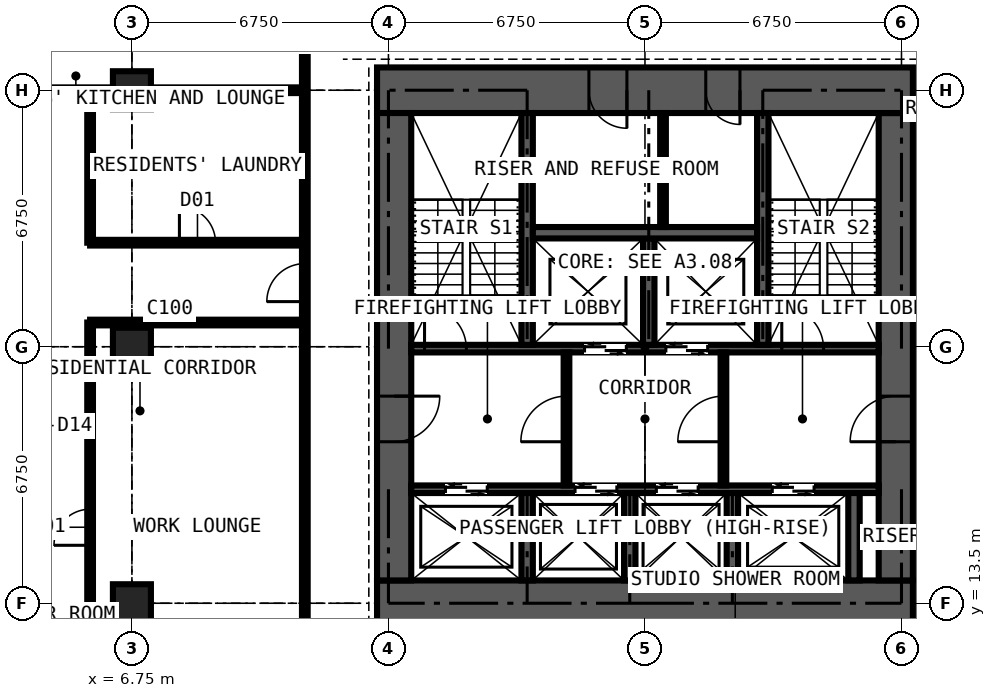
"""IFC4 building model, lengths in metres.
Left out: names, types, materials, properties, quantities, classifications, styles, units other than length and angle.
Written with IfcOpenShell. Run it as: python <this file> out.ifc"""

import sys

from ifc_helpers import new_model, si_unit, direction, frame, frame_2d, origin, origin_2d, place, context, subcontext, project, spatial, rectangle, extrude, element, fill, save


model = new_model("IFC4")
c1 = context("Model", 3, precision=1e-05, world=origin(), true_north=direction((0.0, 1.0)))
c2 = subcontext(c1, "Body", "Model", "MODEL_VIEW")
j1 = project(units=[si_unit("LENGTHUNIT", "METRE"), si_unit("PLANEANGLEUNIT", "RADIAN")], contexts=[c1])
p1 = place(None, origin())
s1 = spatial("IfcSite", under=j1, at=p1, CompositionType="ELEMENT")
p2 = place(p1, origin())
s2 = spatial("IfcBuilding", under=s1, at=p2, CompositionType="ELEMENT")
p3 = place(p2, frame((0.0, 0.0, 233.1)))
s3 = spatial("IfcBuildingStorey", under=s2, at=p3, CompositionType="ELEMENT", Elevation=233.1)
for number, where, z_axis, x_axis in (
    (1, (6.75, 13.5, 0.0), (0.0, 0.0, 1.0), (1.0, 0.0, 0.0)),
    (2, (6.75, 20.25, 0.0), (0.0, 0.0, 1.0), (1.0, 0.0, 0.0)),
    (3, (6.75, 27.0, 0.0), (0.0, 0.0, 1.0), (1.0, 0.0, 0.0)),
):
    element("IfcColumn", number, at=place(p3, frame(where, z_axis=z_axis, x_axis=x_axis)), inside=s3, PredefinedType="COLUMN", context=c2, shape_type="SweptSolid", body=[
        extrude(rectangle(XDim=1.0, YDim=1.0, at=origin_2d()), origin(), (0.0, 0.0, 1.0), 3.6),
    ])
p4 = place(p3, frame((13.2, 13.5, 0.0), z_axis=(0.0, 0.0, 1.0), x_axis=(1.0, 0.0, 0.0)))
e4 = element("IfcWall", 4, at=p4, inside=s3, PredefinedType="SHEAR", context=c2, shape_type="SweptSolid", body=[
    extrude(rectangle(XDim=14.1, YDim=1.2, at=frame_2d((7.05, 0.0))), origin(), (0.0, 0.0, 1.0), 3.6),
])
p5 = place(p3, frame((26.85, 14.1, 0.0), z_axis=(0.0, 0.0, 1.0), x_axis=(0.0, 1.0, 0.0)))
e5 = element("IfcWall", 5, at=p5, inside=s3, PredefinedType="SHEAR", context=c2, shape_type="SweptSolid", body=[
    extrude(rectangle(XDim=12.3, YDim=0.9, at=frame_2d((6.15, 0.0))), origin(), (0.0, 0.0, 1.0), 3.6),
])
p6 = place(p5, frame((3.65, 0.0, 0.0)))
e6 = element("IfcOpeningElement", 6, at=p6, cuts=e5, PredefinedType="OPENING", context=c2, shape_type="SweptSolid", body=[
    extrude(rectangle(XDim=1.2, YDim=2.2, at=frame_2d((0.6, 1.1))), frame((0.0, 0.46, 0.0), z_axis=(0.0, -1.0, 0.0), x_axis=(1.0, 0.0, 0.0)), (0.0, 0.0, 1.0), 0.92),
])
p7 = place(p3, frame((27.3, 27.0, 0.0), z_axis=(0.0, 0.0, 1.0), x_axis=(-1.0, 0.0, 0.0)))
e7 = element("IfcWall", 7, at=p7, inside=s3, PredefinedType="SHEAR", context=c2, shape_type="SweptSolid", body=[
    extrude(rectangle(XDim=14.1, YDim=1.2, at=frame_2d((7.05, 0.0))), origin(), (0.0, 0.0, 1.0), 3.6),
])
p8 = place(p7, frame((4.55, 0.0, 0.0)))
e8 = element("IfcOpeningElement", 8, at=p8, cuts=e7, PredefinedType="OPENING", context=c2, shape_type="SweptSolid", body=[
    extrude(rectangle(XDim=0.9, YDim=2.2, at=frame_2d((0.45, 1.1))), frame((0.0, 0.61, 0.0), z_axis=(0.0, -1.0, 0.0), x_axis=(1.0, 0.0, 0.0)), (0.0, 0.0, 1.0), 1.22),
])
p9 = place(p7, frame((7.525, 0.0, 0.0)))
e9 = element("IfcOpeningElement", 9, at=p9, cuts=e7, PredefinedType="OPENING", context=c2, shape_type="SweptSolid", body=[
    extrude(rectangle(XDim=1.0, YDim=2.2, at=frame_2d((0.5, 1.1))), frame((0.0, 0.61, 0.0), z_axis=(0.0, -1.0, 0.0), x_axis=(1.0, 0.0, 0.0)), (0.0, 0.0, 1.0), 1.22),
])
p10 = place(p3, frame((13.65, 26.4, 0.0), z_axis=(0.0, 0.0, 1.0), x_axis=(0.0, -1.0, 0.0)))
e10 = element("IfcWall", 10, at=p10, inside=s3, PredefinedType="SHEAR", context=c2, shape_type="SweptSolid", body=[
    extrude(rectangle(XDim=12.3, YDim=0.9, at=frame_2d((6.15, 0.0))), origin(), (0.0, 0.0, 1.0), 3.6),
])
p11 = place(p10, frame((7.45, 0.0, 0.0)))
e11 = element("IfcOpeningElement", 11, at=p11, cuts=e10, PredefinedType="OPENING", context=c2, shape_type="SweptSolid", body=[
    extrude(rectangle(XDim=1.2, YDim=2.2, at=frame_2d((0.6, 1.1))), frame((0.0, 0.46, 0.0), z_axis=(0.0, -1.0, 0.0), x_axis=(1.0, 0.0, 0.0)), (0.0, 0.0, 1.0), 0.92),
])
p12 = place(p3, frame((14.1, 16.5, 0.0), z_axis=(0.0, 0.0, 1.0), x_axis=(1.0, 0.0, 0.0)))
e12 = element("IfcWall", 12, at=p12, inside=s3, PredefinedType="SHEAR", context=c2, shape_type="SweptSolid", body=[
    extrude(rectangle(XDim=12.3, YDim=0.2, at=frame_2d((6.15, 0.0))), origin(), (0.0, 0.0, 1.0), 3.6),
])
p13 = place(p12, frame((0.9, 0.0, 0.0)))
e13 = element("IfcOpeningElement", 13, at=p13, cuts=e12, PredefinedType="OPENING", context=c2, shape_type="SweptSolid", body=[
    extrude(rectangle(XDim=1.1, YDim=2.2, at=frame_2d((0.55, 1.1))), frame((0.0, 0.11, 0.0), z_axis=(0.0, -1.0, 0.0), x_axis=(1.0, 0.0, 0.0)), (0.0, 0.0, 1.0), 0.22),
])
p14 = place(p12, frame((4.31, 0.0, 0.0)))
e14 = element("IfcOpeningElement", 14, at=p14, cuts=e12, PredefinedType="OPENING", context=c2, shape_type="SweptSolid", body=[
    extrude(rectangle(XDim=1.1, YDim=2.2, at=frame_2d((0.55, 1.1))), frame((0.0, 0.11, 0.0), z_axis=(0.0, -1.0, 0.0), x_axis=(1.0, 0.0, 0.0)), (0.0, 0.0, 1.0), 0.22),
])
p15 = place(p12, frame((6.45, 0.0, 0.0)))
e15 = element("IfcOpeningElement", 15, at=p15, cuts=e12, PredefinedType="OPENING", context=c2, shape_type="SweptSolid", body=[
    extrude(rectangle(XDim=1.1, YDim=2.2, at=frame_2d((0.55, 1.1))), frame((0.0, 0.11, 0.0), z_axis=(0.0, -1.0, 0.0), x_axis=(1.0, 0.0, 0.0)), (0.0, 0.0, 1.0), 0.22),
])
p16 = place(p12, frame((9.5, 0.0, 0.0)))
e16 = element("IfcOpeningElement", 16, at=p16, cuts=e12, PredefinedType="OPENING", context=c2, shape_type="SweptSolid", body=[
    extrude(rectangle(XDim=1.1, YDim=2.2, at=frame_2d((0.55, 1.1))), frame((0.0, 0.11, 0.0), z_axis=(0.0, -1.0, 0.0), x_axis=(1.0, 0.0, 0.0)), (0.0, 0.0, 1.0), 0.22),
])
p17 = place(p3, frame((14.1, 20.2, 0.0), z_axis=(0.0, 0.0, 1.0), x_axis=(1.0, 0.0, 0.0)))
e17 = element("IfcWall", 17, at=p17, inside=s3, PredefinedType="SHEAR", context=c2, shape_type="SweptSolid", body=[
    extrude(rectangle(XDim=12.3, YDim=0.2, at=frame_2d((6.15, 0.0))), origin(), (0.0, 0.0, 1.0), 3.6),
])
p18 = place(p17, frame((4.56, 0.0, 0.0)))
e18 = element("IfcOpeningElement", 18, at=p18, cuts=e17, PredefinedType="OPENING", context=c2, shape_type="SweptSolid", body=[
    extrude(rectangle(XDim=1.1, YDim=2.2, at=frame_2d((0.55, 1.1))), frame((0.0, 0.11, 0.0), z_axis=(0.0, -1.0, 0.0), x_axis=(1.0, 0.0, 0.0)), (0.0, 0.0, 1.0), 0.22),
])
p19 = place(p17, frame((6.7, 0.0, 0.0)))
e19 = element("IfcOpeningElement", 19, at=p19, cuts=e17, PredefinedType="OPENING", context=c2, shape_type="SweptSolid", body=[
    extrude(rectangle(XDim=1.1, YDim=2.2, at=frame_2d((0.55, 1.1))), frame((0.0, 0.11, 0.0), z_axis=(0.0, -1.0, 0.0), x_axis=(1.0, 0.0, 0.0)), (0.0, 0.0, 1.0), 0.22),
])
p20 = place(p17, frame((0.35, 0.0, 0.0)))
e20 = element("IfcOpeningElement", 20, at=p20, cuts=e17, PredefinedType="OPENING", context=c2, shape_type="SweptSolid", body=[
    extrude(rectangle(XDim=1.1, YDim=2.2, at=frame_2d((0.55, 1.1))), frame((0.0, 0.11, 0.0), z_axis=(0.0, -1.0, 0.0), x_axis=(1.0, 0.0, 0.0)), (0.0, 0.0, 1.0), 0.22),
])
p21 = place(p17, frame((9.75, 0.0, 0.0)))
e21 = element("IfcOpeningElement", 21, at=p21, cuts=e17, PredefinedType="OPENING", context=c2, shape_type="SweptSolid", body=[
    extrude(rectangle(XDim=1.1, YDim=2.2, at=frame_2d((0.55, 1.1))), frame((0.0, 0.11, 0.0), z_axis=(0.0, -1.0, 0.0), x_axis=(1.0, 0.0, 0.0)), (0.0, 0.0, 1.0), 0.22),
])
for number, where, z_axis, x_axis in (
    (22, (17.15, 20.3, 0.0), (0.0, 0.0, 1.0), (0.0, 1.0, 0.0)),
    (23, (23.35, 20.3, 0.0), (0.0, 0.0, 1.0), (0.0, 1.0, 0.0)),
):
    element("IfcWall", number, at=place(p3, frame(where, z_axis=z_axis, x_axis=x_axis)), inside=s3, PredefinedType="SHEAR", context=c2, shape_type="SweptSolid", body=[
        extrude(rectangle(XDim=6.1, YDim=0.3, at=frame_2d((3.05, 0.0))), origin(), (0.0, 0.0, 1.0), 3.6),
    ])
p22 = place(p3, frame((20.35, 20.3, 0.0), z_axis=(0.0, 0.0, 1.0), x_axis=(0.0, 1.0, 0.0)))
e24 = element("IfcWall", 24, at=p22, inside=s3, PredefinedType="SHEAR", context=c2, shape_type="SweptSolid", body=[
    extrude(rectangle(XDim=2.8, YDim=0.3, at=frame_2d((1.4, 0.0))), origin(), (0.0, 0.0, 1.0), 3.6),
])
p23 = place(p3, frame((17.3, 23.25, 0.0), z_axis=(0.0, 0.0, 1.0), x_axis=(1.0, 0.0, 0.0)))
e25 = element("IfcWall", 25, at=p23, inside=s3, PredefinedType="SHEAR", context=c2, shape_type="SweptSolid", body=[
    extrude(rectangle(XDim=5.9, YDim=0.3, at=frame_2d((2.95, 0.0))), origin(), (0.0, 0.0, 1.0), 3.6),
])
for number, where, z_axis, x_axis in (
    (26, (17.15, 14.1, 0.0), (0.0, 0.0, 1.0), (0.0, 1.0, 0.0)),
    (27, (19.85, 14.1, 0.0), (0.0, 0.0, 1.0), (0.0, 1.0, 0.0)),
    (28, (22.55, 14.1, 0.0), (0.0, 0.0, 1.0), (0.0, 1.0, 0.0)),
    (29, (25.75, 14.1, 0.0), (0.0, 0.0, 1.0), (0.0, 1.0, 0.0)),
):
    element("IfcWall", number, at=place(p3, frame(where, z_axis=z_axis, x_axis=x_axis)), inside=s3, PredefinedType="SHEAR", context=c2, shape_type="SweptSolid", body=[
        extrude(rectangle(XDim=2.3, YDim=0.3, at=frame_2d((1.15, 0.0))), origin(), (0.0, 0.0, 1.0), 3.6),
    ])
p24 = place(p3, frame((18.185, 16.6, 0.0), z_axis=(0.0, 0.0, 1.0), x_axis=(0.0, 1.0, 0.0)))
e30 = element("IfcWall", 30, at=p24, inside=s3, PredefinedType="PARTITIONING", context=c2, shape_type="SweptSolid", body=[
    extrude(rectangle(XDim=3.5, YDim=0.15, at=frame_2d((1.75, 0.0))), origin(), (0.0, 0.0, 1.0), 3.375),
])
p25 = place(p24, frame((1.15, 0.0, 0.0)))
e31 = element("IfcOpeningElement", 31, at=p25, cuts=e30, PredefinedType="OPENING", context=c2, shape_type="SweptSolid", body=[
    extrude(rectangle(XDim=1.2, YDim=2.2, at=frame_2d((0.6, 1.1))), frame((0.0, 0.085, 0.0), z_axis=(0.0, -1.0, 0.0), x_axis=(1.0, 0.0, 0.0)), (0.0, 0.0, 1.0), 0.17),
])
p26 = place(p3, frame((22.315, 16.6, 0.0), z_axis=(0.0, 0.0, 1.0), x_axis=(0.0, 1.0, 0.0)))
e32 = element("IfcWall", 32, at=p26, inside=s3, PredefinedType="PARTITIONING", context=c2, shape_type="SweptSolid", body=[
    extrude(rectangle(XDim=3.5, YDim=0.15, at=frame_2d((1.75, 0.0))), origin(), (0.0, 0.0, 1.0), 3.375),
])
p27 = place(p26, frame((1.15, 0.0, 0.0)))
e33 = element("IfcOpeningElement", 33, at=p27, cuts=e32, PredefinedType="OPENING", context=c2, shape_type="SweptSolid", body=[
    extrude(rectangle(XDim=1.2, YDim=2.2, at=frame_2d((0.6, 1.1))), frame((0.0, 0.085, 0.0), z_axis=(0.0, -1.0, 0.0), x_axis=(1.0, 0.0, 0.0)), (0.0, 0.0, 1.0), 0.17),
])
p28 = place(p3, frame((20.725, 23.4, 0.0), z_axis=(0.0, 0.0, 1.0), x_axis=(0.0, 1.0, 0.0)))
e34 = element("IfcWall", 34, at=p28, inside=s3, PredefinedType="PARTITIONING", context=c2, shape_type="SweptSolid", body=[
    extrude(rectangle(XDim=3.0, YDim=0.15, at=frame_2d((1.5, 0.0))), origin(), (0.0, 0.0, 1.0), 3.375),
])
p29 = place(p3, frame((4.15, 27.0, 0.0), z_axis=(0.0, 0.0, 1.0), x_axis=(1.0, 0.0, 0.0)))
e35 = element("IfcWall", 35, at=p29, inside=s3, PredefinedType="PARTITIONING", context=c2, shape_type="SweptSolid", body=[
    extrude(rectangle(XDim=7.15, YDim=0.15, at=frame_2d((3.575, 0.0))), origin(), (0.0, 0.0, 1.0), 2.877),
])
p30 = place(p3, frame((5.65, 10.125, 0.0), z_axis=(0.0, 0.0, 1.0), x_axis=(0.0, 1.0, 0.0)))
e36 = element("IfcWall", 36, at=p30, inside=s3, PredefinedType="PARTITIONING", context=c2, shape_type="SweptSolid", body=[
    extrude(rectangle(XDim=10.762, YDim=0.15, at=frame_2d((5.381, 0.0))), origin(), (0.0, 0.0, 1.0), 3.375),
])
p31 = place(p30, frame((4.9, 0.0, 0.0)))
e37 = element("IfcOpeningElement", 37, at=p31, cuts=e36, PredefinedType="OPENING", context=c2, shape_type="SweptSolid", body=[
    extrude(rectangle(XDim=0.95, YDim=2.2, at=frame_2d((0.475, 1.1))), frame((0.0, 0.085, 0.0), z_axis=(0.0, -1.0, 0.0), x_axis=(1.0, 0.0, 0.0)), (0.0, 0.0, 1.0), 0.17),
])
p32 = place(p3, frame((5.65, 20.887, 0.0), z_axis=(0.0, 0.0, 1.0), x_axis=(1.0, 0.0, 0.0)))
e38 = element("IfcWall", 38, at=p32, inside=s3, PredefinedType="PARTITIONING", context=c2, shape_type="SweptSolid", body=[
    extrude(rectangle(XDim=5.65, YDim=0.15, at=frame_2d((2.825, 0.0))), origin(), (0.0, 0.0, 1.0), 3.375),
])
p33 = place(p3, frame((5.65, 22.988, 0.0), z_axis=(0.0, 0.0, 1.0), x_axis=(0.0, 1.0, 0.0)))
e39 = element("IfcWall", 39, at=p33, inside=s3, PredefinedType="PARTITIONING", context=c2, shape_type="SweptSolid", body=[
    extrude(rectangle(XDim=4.012, YDim=0.15, at=frame_2d((2.006, 0.0))), origin(), (0.0, 0.0, 1.0), 3.375),
])
p34 = place(p3, frame((5.65, 22.988, 0.0), z_axis=(0.0, 0.0, 1.0), x_axis=(1.0, 0.0, 0.0)))
e40 = element("IfcWall", 40, at=p34, inside=s3, PredefinedType="PARTITIONING", context=c2, shape_type="SweptSolid", body=[
    extrude(rectangle(XDim=5.65, YDim=0.15, at=frame_2d((2.825, 0.0))), origin(), (0.0, 0.0, 1.0), 3.375),
])
p35 = place(p34, frame((2.35, 0.0, 0.0)))
e41 = element("IfcOpeningElement", 41, at=p35, cuts=e40, PredefinedType="OPENING", context=c2, shape_type="SweptSolid", body=[
    extrude(rectangle(XDim=0.95, YDim=2.2, at=frame_2d((0.475, 1.1))), frame((0.0, 0.085, 0.0), z_axis=(0.0, -1.0, 0.0), x_axis=(1.0, 0.0, 0.0)), (0.0, 0.0, 1.0), 0.17),
])
p36 = place(p3, frame((11.3, 11.3, 0.0), z_axis=(0.0, 0.0, 1.0), x_axis=(0.0, 1.0, 0.0)))
e42 = element("IfcWall", 42, at=p36, inside=s3, PredefinedType="PARTITIONING", context=c2, shape_type="SweptSolid", body=[
    extrude(rectangle(XDim=19.3, YDim=0.15, at=frame_2d((9.65, 0.0))), origin(), (0.0, 0.0, 1.0), 3.375),
])
p37 = place(p36, frame((18.1, 0.0, 0.0)))
e43 = element("IfcOpeningElement", 43, at=p37, cuts=e42, PredefinedType="OPENING", context=c2, shape_type="SweptSolid", body=[
    extrude(rectangle(XDim=1.0, YDim=2.2, at=frame_2d((0.5, 1.1))), frame((0.0, 0.085, 0.0), z_axis=(0.0, -1.0, 0.0), x_axis=(1.0, 0.0, 0.0)), (0.0, 0.0, 1.0), 0.17),
])
p38 = place(p36, frame((10.137, 0.0, 0.0)))
e44 = element("IfcOpeningElement", 44, at=p38, cuts=e42, PredefinedType="OPENING", context=c2, shape_type="SweptSolid", body=[
    extrude(rectangle(XDim=1.0, YDim=2.2, at=frame_2d((0.5, 1.1))), frame((0.0, 0.085, 0.0), z_axis=(0.0, -1.0, 0.0), x_axis=(1.0, 0.0, 0.0)), (0.0, 0.0, 1.0), 0.17),
])
p39 = place(p13, origin())
e45 = element("IfcDoor", 45, at=p39, inside=s3, OperationType="DOUBLE_DOOR_SLIDING", PredefinedType="DOOR", context=c2, shape_type="SweptSolid", body=[
    extrude(rectangle(XDim=1.1, YDim=2.2, at=frame_2d((0.55, 1.1))), frame((0.0, 0.025, 0.0), z_axis=(0.0, -1.0, 0.0), x_axis=(1.0, 0.0, 0.0)), (0.0, 0.0, 1.0), 0.05),
])
fill(e13, e45)
p40 = place(p14, origin())
e46 = element("IfcDoor", 46, at=p40, inside=s3, OperationType="DOUBLE_DOOR_SLIDING", PredefinedType="DOOR", context=c2, shape_type="SweptSolid", body=[
    extrude(rectangle(XDim=1.1, YDim=2.2, at=frame_2d((0.55, 1.1))), frame((0.0, 0.025, 0.0), z_axis=(0.0, -1.0, 0.0), x_axis=(1.0, 0.0, 0.0)), (0.0, 0.0, 1.0), 0.05),
])
fill(e14, e46)
p41 = place(p15, origin())
e47 = element("IfcDoor", 47, at=p41, inside=s3, OperationType="DOUBLE_DOOR_SLIDING", PredefinedType="DOOR", context=c2, shape_type="SweptSolid", body=[
    extrude(rectangle(XDim=1.1, YDim=2.2, at=frame_2d((0.55, 1.1))), frame((0.0, 0.025, 0.0), z_axis=(0.0, -1.0, 0.0), x_axis=(1.0, 0.0, 0.0)), (0.0, 0.0, 1.0), 0.05),
])
fill(e15, e47)
p42 = place(p16, origin())
e48 = element("IfcDoor", 48, at=p42, inside=s3, OperationType="DOUBLE_DOOR_SLIDING", PredefinedType="DOOR", context=c2, shape_type="SweptSolid", body=[
    extrude(rectangle(XDim=1.1, YDim=2.2, at=frame_2d((0.55, 1.1))), frame((0.0, 0.025, 0.0), z_axis=(0.0, -1.0, 0.0), x_axis=(1.0, 0.0, 0.0)), (0.0, 0.0, 1.0), 0.05),
])
fill(e16, e48)
p43 = place(p18, origin())
e49 = element("IfcDoor", 49, at=p43, inside=s3, OperationType="DOUBLE_DOOR_SLIDING", PredefinedType="DOOR", context=c2, shape_type="SweptSolid", body=[
    extrude(rectangle(XDim=1.1, YDim=2.2, at=frame_2d((0.55, 1.1))), frame((0.0, 0.025, 0.0), z_axis=(0.0, -1.0, 0.0), x_axis=(1.0, 0.0, 0.0)), (0.0, 0.0, 1.0), 0.05),
])
fill(e18, e49)
p44 = place(p19, origin())
e50 = element("IfcDoor", 50, at=p44, inside=s3, OperationType="DOUBLE_DOOR_SLIDING", PredefinedType="DOOR", context=c2, shape_type="SweptSolid", body=[
    extrude(rectangle(XDim=1.1, YDim=2.2, at=frame_2d((0.55, 1.1))), frame((0.0, 0.025, 0.0), z_axis=(0.0, -1.0, 0.0), x_axis=(1.0, 0.0, 0.0)), (0.0, 0.0, 1.0), 0.05),
])
fill(e19, e50)
p45 = place(p11, origin())
e51 = element("IfcDoor", 51, at=p45, inside=s3, OperationType="DOUBLE_DOOR_SINGLE_SWING", PredefinedType="DOOR", context=c2, shape_type="SweptSolid", body=[
    extrude(rectangle(XDim=1.2, YDim=2.2, at=frame_2d((0.6, 1.1))), frame((0.0, 0.025, 0.0), z_axis=(0.0, -1.0, 0.0), x_axis=(1.0, 0.0, 0.0)), (0.0, 0.0, 1.0), 0.05),
])
fill(e11, e51)
p46 = place(p6, origin())
e52 = element("IfcDoor", 52, at=p46, inside=s3, OperationType="DOUBLE_DOOR_SINGLE_SWING", PredefinedType="DOOR", context=c2, shape_type="SweptSolid", body=[
    extrude(rectangle(XDim=1.2, YDim=2.2, at=frame_2d((0.6, 1.1))), frame((0.0, 0.025, 0.0), z_axis=(0.0, -1.0, 0.0), x_axis=(1.0, 0.0, 0.0)), (0.0, 0.0, 1.0), 0.05),
])
fill(e6, e52)
p47 = place(p25, origin())
e53 = element("IfcDoor", 53, at=p47, inside=s3, OperationType="DOUBLE_DOOR_SINGLE_SWING", PredefinedType="DOOR", context=c2, shape_type="SweptSolid", body=[
    extrude(rectangle(XDim=1.2, YDim=2.2, at=frame_2d((0.6, 1.1))), frame((0.0, 0.025, 0.0), z_axis=(0.0, -1.0, 0.0), x_axis=(1.0, 0.0, 0.0)), (0.0, 0.0, 1.0), 0.05),
])
fill(e31, e53)
p48 = place(p27, origin())
e54 = element("IfcDoor", 54, at=p48, inside=s3, OperationType="DOUBLE_DOOR_SINGLE_SWING", PredefinedType="DOOR", context=c2, shape_type="SweptSolid", body=[
    extrude(rectangle(XDim=1.2, YDim=2.2, at=frame_2d((0.6, 1.1))), frame((0.0, 0.025, 0.0), z_axis=(0.0, -1.0, 0.0), x_axis=(1.0, 0.0, 0.0)), (0.0, 0.0, 1.0), 0.05),
])
fill(e33, e54)
p49 = place(p8, origin())
e55 = element("IfcDoor", 55, at=p49, inside=s3, OperationType="SINGLE_SWING_LEFT", PredefinedType="DOOR", context=c2, shape_type="SweptSolid", body=[
    extrude(rectangle(XDim=0.9, YDim=2.2, at=frame_2d((0.45, 1.1))), frame((0.0, 0.4, 0.0), z_axis=(0.0, -1.0, 0.0), x_axis=(1.0, 0.0, 0.0)), (0.0, 0.0, 1.0), 0.8),
])
fill(e8, e55)
p50 = place(p9, origin())
e56 = element("IfcDoor", 56, at=p50, inside=s3, OperationType="SINGLE_SWING_LEFT", PredefinedType="DOOR", context=c2, shape_type="SweptSolid", body=[
    extrude(rectangle(XDim=1.0, YDim=2.2, at=frame_2d((0.5, 1.1))), frame((0.0, 0.025, 0.0), z_axis=(0.0, -1.0, 0.0), x_axis=(1.0, 0.0, 0.0)), (0.0, 0.0, 1.0), 0.05),
])
fill(e9, e56)
p51 = place(p20, origin())
e57 = element("IfcDoor", 57, at=p51, inside=s3, OperationType="SINGLE_SWING_LEFT", PredefinedType="DOOR", context=c2, shape_type="SweptSolid", body=[
    extrude(rectangle(XDim=1.1, YDim=2.2, at=frame_2d((0.55, 1.1))), frame((0.0, 0.025, 0.0), z_axis=(0.0, -1.0, 0.0), x_axis=(1.0, 0.0, 0.0)), (0.0, 0.0, 1.0), 0.05),
])
fill(e20, e57)
p52 = place(p21, origin())
e58 = element("IfcDoor", 58, at=p52, inside=s3, OperationType="SINGLE_SWING_LEFT", PredefinedType="DOOR", context=c2, shape_type="SweptSolid", body=[
    extrude(rectangle(XDim=1.1, YDim=2.2, at=frame_2d((0.55, 1.1))), frame((0.0, 0.025, 0.0), z_axis=(0.0, -1.0, 0.0), x_axis=(1.0, 0.0, 0.0)), (0.0, 0.0, 1.0), 0.05),
])
fill(e21, e58)
p53 = place(p38, origin())
e59 = element("IfcDoor", 59, at=p53, inside=s3, OperationType="SINGLE_SWING_LEFT", PredefinedType="DOOR", context=c2, shape_type="SweptSolid", body=[
    extrude(rectangle(XDim=1.0, YDim=2.2, at=frame_2d((0.5, 1.1))), frame((0.0, 0.025, 0.0), z_axis=(0.0, -1.0, 0.0), x_axis=(1.0, 0.0, 0.0)), (0.0, 0.0, 1.0), 0.05),
])
fill(e44, e59)
p54 = place(p35, origin())
e60 = element("IfcDoor", 60, at=p54, inside=s3, OperationType="SINGLE_SWING_LEFT", PredefinedType="DOOR", context=c2, shape_type="SweptSolid", body=[
    extrude(rectangle(XDim=0.95, YDim=2.2, at=frame_2d((0.475, 1.1))), frame((0.0, 0.025, 0.0), z_axis=(0.0, -1.0, 0.0), x_axis=(1.0, 0.0, 0.0)), (0.0, 0.0, 1.0), 0.05),
])
fill(e41, e60)
p55 = place(p31, origin())
e61 = element("IfcDoor", 61, at=p55, inside=s3, OperationType="SINGLE_SWING_LEFT", PredefinedType="DOOR", context=c2, shape_type="SweptSolid", body=[
    extrude(rectangle(XDim=0.95, YDim=2.2, at=frame_2d((0.475, 1.1))), frame((0.0, 0.025, 0.0), z_axis=(0.0, -1.0, 0.0), x_axis=(1.0, 0.0, 0.0)), (0.0, 0.0, 1.0), 0.05),
])
fill(e37, e61)
save(model, sys.argv[1])
